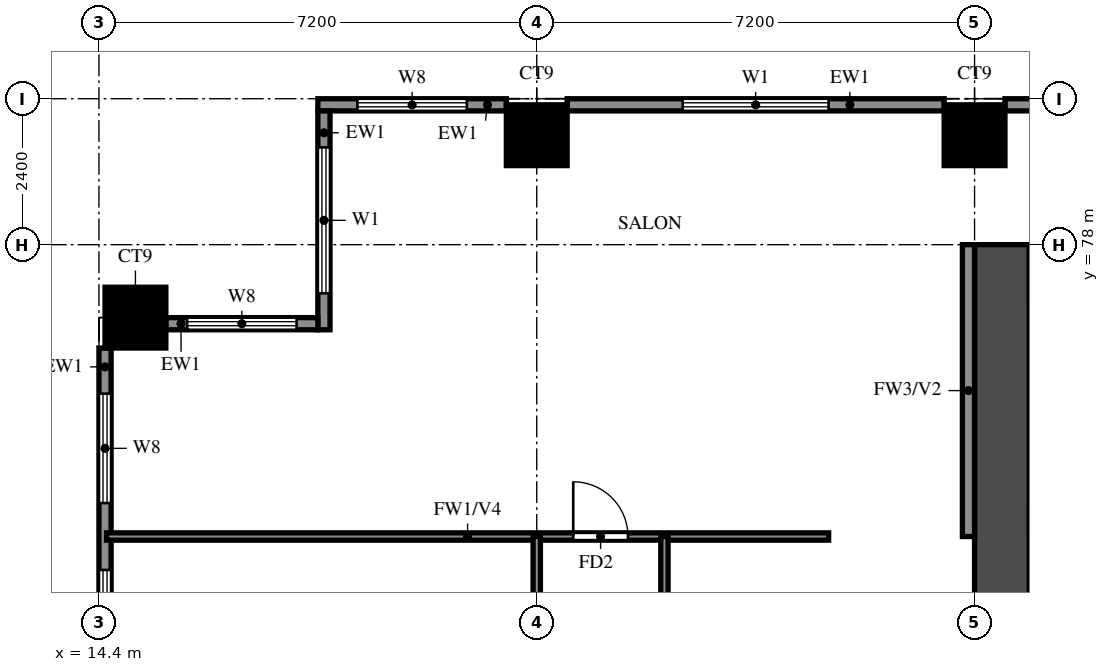
"""IFC4 building model, lengths in metres.
Left out: names, types, materials, properties, quantities, classifications, styles, units other than length and angle.
Written with IfcOpenShell. Run it as: python <this file> out.ifc"""

import sys

from ifc_helpers import new_model, si_unit, direction, frame, frame_2d, origin, origin_2d, place, context, subcontext, project, spatial, rectangle, extrude, source, transform, mapped, element, fill, save


model = new_model("IFC4")
c1 = context("Model", 3, precision=1e-05, world=origin(), true_north=direction((0.0, 1.0)))
c2 = subcontext(c1, "Body", "Model", "MODEL_VIEW")
j1 = project(units=[si_unit("LENGTHUNIT", "METRE"), si_unit("PLANEANGLEUNIT", "RADIAN")], contexts=[c1])
p1 = place(None, origin())
s1 = spatial("IfcSite", under=j1, at=p1, CompositionType="ELEMENT")
p2 = place(p1, origin())
s2 = spatial("IfcBuilding", under=s1, at=p2, CompositionType="ELEMENT")
p3 = place(p2, frame((0.0, 0.0, 69.0)))
s3 = spatial("IfcBuildingStorey", under=s2, at=p3, CompositionType="ELEMENT", Elevation=69.0)
m1 = source(origin(), c2, "Body", "SweptSolid", [
    extrude(rectangle(XDim=1.0, YDim=1.0, at=origin_2d()), origin(), (0.0, 0.0, 1.0), 3.18),
])
for number, where, z_axis, x_axis in (
    (1, (15.0, 76.8, 0.0), (0.0, 0.0, 1.0), (1.0, 0.0, 0.0)),
    (2, (21.6, 79.8, 0.0), (0.0, 0.0, 1.0), (1.0, 0.0, 0.0)),
    (3, (28.8, 79.8, 0.0), (0.0, 0.0, 1.0), (1.0, 0.0, 0.0)),
):
    element("IfcColumn", number, at=place(p3, frame(where, z_axis=z_axis, x_axis=x_axis)), inside=s3, PredefinedType="COLUMN", context=c2, shape_type="MappedRepresentation", body=[
        mapped(m1, transform((0.0, 0.0, 0.0))),
    ])
p4 = place(p3, frame((29.25, 66.0, 0.0), z_axis=(0.0, 0.0, 1.0), x_axis=(0.0, 1.0, 0.0)))
e4 = element("IfcWall", 4, at=p4, inside=s3, PredefinedType="SHEAR", context=c2, shape_type="SweptSolid", body=[
    extrude(rectangle(XDim=12.0, YDim=0.9, at=frame_2d((6.0, 0.0))), origin(), (0.0, 0.0, 1.0), 3.18),
])
p5 = place(p3, frame((29.7, 73.475, 0.0), z_axis=(0.0, 0.0, 1.0), x_axis=(1.0, 0.0, 0.0)))
e5 = element("IfcWall", 5, at=p5, inside=s3, PredefinedType="SHEAR", context=c2, shape_type="SweptSolid", body=[
    extrude(rectangle(XDim=3.175, YDim=0.45, at=frame_2d((1.587, 0.0))), origin(), (0.0, 0.0, 1.0), 3.18),
])
p6 = place(p3, frame((35.5, 80.3, 0.0), z_axis=(0.0, 0.0, 1.0), x_axis=(-1.0, 0.0, 0.0)))
e6 = element("IfcWall", 6, at=p6, inside=s3, PredefinedType="SOLIDWALL", context=c2, shape_type="SweptSolid", body=[
    extrude(rectangle(XDim=6.2, YDim=0.2, at=frame_2d((3.1, 0.0))), origin(), (0.0, 0.0, 1.0), 3.18),
])
p7 = place(p3, frame((28.3, 80.3, 0.0), z_axis=(0.0, 0.0, 1.0), x_axis=(-1.0, 0.0, 0.0)))
e7 = element("IfcWall", 7, at=p7, inside=s3, PredefinedType="SOLIDWALL", context=c2, shape_type="SweptSolid", body=[
    extrude(rectangle(XDim=6.2, YDim=0.2, at=frame_2d((3.1, 0.0))), origin(), (0.0, 0.0, 1.0), 3.18),
])
p8 = place(p7, frame((1.9, 0.0, 0.6)))
e8 = element("IfcOpeningElement", 8, at=p8, cuts=e7, PredefinedType="OPENING", context=c2, shape_type="SweptSolid", body=[
    extrude(rectangle(XDim=2.4, YDim=2.4, at=frame_2d((1.2, 1.2))), frame((0.0, 0.11, 0.0), z_axis=(0.0, -1.0, 0.0), x_axis=(1.0, 0.0, 0.0)), (0.0, 0.0, 1.0), 0.22),
])
p9 = place(p3, frame((21.1, 80.3, 0.0), z_axis=(0.0, 0.0, 1.0), x_axis=(-1.0, 0.0, 0.0)))
e9 = element("IfcWall", 9, at=p9, inside=s3, PredefinedType="SOLIDWALL", context=c2, shape_type="SweptSolid", body=[
    extrude(rectangle(XDim=3.1, YDim=0.2, at=frame_2d((1.55, 0.0))), origin(), (0.0, 0.0, 1.0), 3.18),
])
p10 = place(p9, frame((0.65, 0.0, 0.6)))
e10 = element("IfcOpeningElement", 10, at=p10, cuts=e9, PredefinedType="OPENING", context=c2, shape_type="SweptSolid", body=[
    extrude(rectangle(XDim=1.8, YDim=2.4, at=frame_2d((0.9, 1.2))), frame((0.0, 0.11, 0.0), z_axis=(0.0, -1.0, 0.0), x_axis=(1.0, 0.0, 0.0)), (0.0, 0.0, 1.0), 0.22),
])
p11 = place(p3, frame((18.1, 80.2, 0.0), z_axis=(0.0, 0.0, 1.0), x_axis=(0.0, -1.0, 0.0)))
e11 = element("IfcWall", 11, at=p11, inside=s3, PredefinedType="SOLIDWALL", context=c2, shape_type="SweptSolid", body=[
    extrude(rectangle(XDim=3.6, YDim=0.2, at=frame_2d((1.8, 0.0))), origin(), (0.0, 0.0, 1.0), 3.18),
])
p12 = place(p11, frame((0.6, 0.0, 0.6)))
e12 = element("IfcOpeningElement", 12, at=p12, cuts=e11, PredefinedType="OPENING", context=c2, shape_type="SweptSolid", body=[
    extrude(rectangle(XDim=2.4, YDim=2.4, at=frame_2d((1.2, 1.2))), frame((0.0, 0.11, 0.0), z_axis=(0.0, -1.0, 0.0), x_axis=(1.0, 0.0, 0.0)), (0.0, 0.0, 1.0), 0.22),
])
p13 = place(p3, frame((18.0, 76.7, 0.0), z_axis=(0.0, 0.0, 1.0), x_axis=(-1.0, 0.0, 0.0)))
e13 = element("IfcWall", 13, at=p13, inside=s3, PredefinedType="SOLIDWALL", context=c2, shape_type="SweptSolid", body=[
    extrude(rectangle(XDim=2.5, YDim=0.2, at=frame_2d((1.25, 0.0))), origin(), (0.0, 0.0, 1.0), 3.18),
])
p14 = place(p13, frame((0.35, 0.0, 0.6)))
e14 = element("IfcOpeningElement", 14, at=p14, cuts=e13, PredefinedType="OPENING", context=c2, shape_type="SweptSolid", body=[
    extrude(rectangle(XDim=1.8, YDim=2.4, at=frame_2d((0.9, 1.2))), frame((0.0, 0.11, 0.0), z_axis=(0.0, -1.0, 0.0), x_axis=(1.0, 0.0, 0.0)), (0.0, 0.0, 1.0), 0.22),
])
p15 = place(p3, frame((14.5, 76.3, 0.0), z_axis=(0.0, 0.0, 1.0), x_axis=(0.0, -1.0, 0.0)))
e15 = element("IfcWall", 15, at=p15, inside=s3, PredefinedType="SOLIDWALL", context=c2, shape_type="SweptSolid", body=[
    extrude(rectangle(XDim=6.2, YDim=0.2, at=frame_2d((3.1, 0.0))), origin(), (0.0, 0.0, 1.0), 3.18),
])
p16 = place(p15, frame((3.65, 0.0, 0.6)))
e16 = element("IfcOpeningElement", 16, at=p16, cuts=e15, PredefinedType="OPENING", context=c2, shape_type="SweptSolid", body=[
    extrude(rectangle(XDim=1.8, YDim=2.4, at=frame_2d((0.9, 1.2))), frame((0.0, 0.11, 0.0), z_axis=(0.0, -1.0, 0.0), x_axis=(1.0, 0.0, 0.0)), (0.0, 0.0, 1.0), 0.22),
])
p17 = place(p15, frame((0.75, 0.0, 0.6)))
e17 = element("IfcOpeningElement", 17, at=p17, cuts=e15, PredefinedType="OPENING", context=c2, shape_type="SweptSolid", body=[
    extrude(rectangle(XDim=1.8, YDim=2.4, at=frame_2d((0.9, 1.2))), frame((0.0, 0.11, 0.0), z_axis=(0.0, -1.0, 0.0), x_axis=(1.0, 0.0, 0.0)), (0.0, 0.0, 1.0), 0.22),
])
p18 = place(p3, frame((28.7, 73.2, 0.0), z_axis=(0.0, 0.0, 1.0), x_axis=(0.0, 1.0, 0.0)))
e18 = element("IfcWall", 18, at=p18, inside=s3, PredefinedType="SOLIDWALL", context=c2, shape_type="SweptSolid", body=[
    extrude(rectangle(XDim=4.8, YDim=0.2, at=frame_2d((2.4, 0.0))), origin(), (0.0, 0.0, 1.0), 3.18),
])
p19 = place(p3, frame((14.525, 73.2, 0.0), z_axis=(0.0, 0.0, 1.0), x_axis=(1.0, 0.0, 0.0)))
e19 = element("IfcWall", 19, at=p19, inside=s3, PredefinedType="PARTITIONING", context=c2, shape_type="SweptSolid", body=[
    extrude(rectangle(XDim=11.875, YDim=0.12, at=frame_2d((5.938, 0.0))), origin(), (0.0, 0.0, 1.0), 2.28),
])
p20 = place(p19, frame((7.675, 0.0, 0.0)))
e20 = element("IfcOpeningElement", 20, at=p20, cuts=e19, PredefinedType="OPENING", context=c2, shape_type="SweptSolid", body=[
    extrude(rectangle(XDim=0.9, YDim=2.1, at=frame_2d((0.45, 1.05))), frame((0.0, 0.07, 0.0), z_axis=(0.0, -1.0, 0.0), x_axis=(1.0, 0.0, 0.0)), (0.0, 0.0, 1.0), 0.14),
])
p21 = place(p3, frame((21.6, 33.725, 0.0), z_axis=(0.0, 0.0, 1.0), x_axis=(0.0, 1.0, 0.0)))
e21 = element("IfcWall", 21, at=p21, inside=s3, PredefinedType="PARTITIONING", context=c2, shape_type="SweptSolid", body=[
    extrude(rectangle(XDim=39.475, YDim=0.12, at=frame_2d((19.737, 0.0))), origin(), (0.0, 0.0, 1.0), 3.18),
])
p22 = place(p21, frame((7.775, 0.0, 0.0)))
e22 = element("IfcOpeningElement", 22, at=p22, cuts=e21, PredefinedType="OPENING", context=c2, shape_type="SweptSolid", body=[
    extrude(rectangle(XDim=0.9, YDim=2.1, at=frame_2d((0.45, 1.05))), frame((0.0, 0.07, 0.0), z_axis=(0.0, -1.0, 0.0), x_axis=(1.0, 0.0, 0.0)), (0.0, 0.0, 1.0), 0.14),
])
p23 = place(p21, frame((15.625, 0.0, 0.0)))
e23 = element("IfcOpeningElement", 23, at=p23, cuts=e21, PredefinedType="OPENING", context=c2, shape_type="SweptSolid", body=[
    extrude(rectangle(XDim=0.9, YDim=2.1, at=frame_2d((0.45, 1.05))), frame((0.0, 0.07, 0.0), z_axis=(0.0, -1.0, 0.0), x_axis=(1.0, 0.0, 0.0)), (0.0, 0.0, 1.0), 0.14),
])
p24 = place(p21, frame((19.225, 0.0, 0.0)))
e24 = element("IfcOpeningElement", 24, at=p24, cuts=e21, PredefinedType="OPENING", context=c2, shape_type="SweptSolid", body=[
    extrude(rectangle(XDim=0.9, YDim=2.1, at=frame_2d((0.45, 1.05))), frame((0.0, 0.07, 0.0), z_axis=(0.0, -1.0, 0.0), x_axis=(1.0, 0.0, 0.0)), (0.0, 0.0, 1.0), 0.14),
])
p25 = place(p21, frame((24.325, 0.0, 0.0)))
e25 = element("IfcOpeningElement", 25, at=p25, cuts=e21, PredefinedType="OPENING", context=c2, shape_type="SweptSolid", body=[
    extrude(rectangle(XDim=1.5, YDim=2.1, at=frame_2d((0.75, 1.05))), frame((0.0, 0.07, 0.0), z_axis=(0.0, -1.0, 0.0), x_axis=(1.0, 0.0, 0.0)), (0.0, 0.0, 1.0), 0.14),
])
p26 = place(p21, frame((30.025, 0.0, 0.0)))
e26 = element("IfcOpeningElement", 26, at=p26, cuts=e21, PredefinedType="OPENING", context=c2, shape_type="SweptSolid", body=[
    extrude(rectangle(XDim=0.9, YDim=2.1, at=frame_2d((0.45, 1.05))), frame((0.0, 0.07, 0.0), z_axis=(0.0, -1.0, 0.0), x_axis=(1.0, 0.0, 0.0)), (0.0, 0.0, 1.0), 0.14),
])
p27 = place(p21, frame((33.625, 0.0, 0.0)))
e27 = element("IfcOpeningElement", 27, at=p27, cuts=e21, PredefinedType="OPENING", context=c2, shape_type="SweptSolid", body=[
    extrude(rectangle(XDim=0.9, YDim=2.1, at=frame_2d((0.45, 1.05))), frame((0.0, 0.07, 0.0), z_axis=(0.0, -1.0, 0.0), x_axis=(1.0, 0.0, 0.0)), (0.0, 0.0, 1.0), 0.14),
])
p28 = place(p21, frame((37.225, 0.0, 0.0)))
e28 = element("IfcOpeningElement", 28, at=p28, cuts=e21, PredefinedType="OPENING", context=c2, shape_type="SweptSolid", body=[
    extrude(rectangle(XDim=0.9, YDim=2.1, at=frame_2d((0.45, 1.05))), frame((0.0, 0.07, 0.0), z_axis=(0.0, -1.0, 0.0), x_axis=(1.0, 0.0, 0.0)), (0.0, 0.0, 1.0), 0.14),
])
p29 = place(p3, frame((23.7, 64.8, 0.0), z_axis=(0.0, 0.0, 1.0), x_axis=(0.0, 1.0, 0.0)))
e29 = element("IfcWall", 29, at=p29, inside=s3, PredefinedType="PARTITIONING", context=c2, shape_type="SweptSolid", body=[
    extrude(rectangle(XDim=8.4, YDim=0.12, at=frame_2d((4.2, 0.0))), origin(), (0.0, 0.0, 1.0), 3.18),
])
p30 = place(p29, frame((4.925, 0.0, 0.0)))
e30 = element("IfcOpeningElement", 30, at=p30, cuts=e29, PredefinedType="OPENING", context=c2, shape_type="SweptSolid", body=[
    extrude(rectangle(XDim=0.9, YDim=2.1, at=frame_2d((0.45, 1.05))), frame((0.0, 0.07, 0.0), z_axis=(0.0, -1.0, 0.0), x_axis=(1.0, 0.0, 0.0)), (0.0, 0.0, 1.0), 0.14),
])
p31 = place(p8, origin())
e31 = element("IfcWindow", 31, at=p31, inside=s3, PartitioningType="DOUBLE_PANEL_VERTICAL", PredefinedType="WINDOW", context=c2, shape_type="SweptSolid", body=[
    extrude(rectangle(XDim=2.4, YDim=2.4, at=frame_2d((1.2, 1.2))), frame((0.0, 0.03, 0.0), z_axis=(0.0, -1.0, 0.0), x_axis=(1.0, 0.0, 0.0)), (0.0, 0.0, 1.0), 0.06),
])
fill(e8, e31)
p32 = place(p10, origin())
e32 = element("IfcWindow", 32, at=p32, inside=s3, PartitioningType="DOUBLE_PANEL_VERTICAL", PredefinedType="WINDOW", context=c2, shape_type="SweptSolid", body=[
    extrude(rectangle(XDim=1.8, YDim=2.4, at=frame_2d((0.9, 1.2))), frame((0.0, 0.03, 0.0), z_axis=(0.0, -1.0, 0.0), x_axis=(1.0, 0.0, 0.0)), (0.0, 0.0, 1.0), 0.06),
])
fill(e10, e32)
p33 = place(p12, origin())
e33 = element("IfcWindow", 33, at=p33, inside=s3, PartitioningType="DOUBLE_PANEL_VERTICAL", PredefinedType="WINDOW", context=c2, shape_type="SweptSolid", body=[
    extrude(rectangle(XDim=2.4, YDim=2.4, at=frame_2d((1.2, 1.2))), frame((0.0, 0.03, 0.0), z_axis=(0.0, -1.0, 0.0), x_axis=(1.0, 0.0, 0.0)), (0.0, 0.0, 1.0), 0.06),
])
fill(e12, e33)
p34 = place(p14, origin())
e34 = element("IfcWindow", 34, at=p34, inside=s3, PartitioningType="DOUBLE_PANEL_VERTICAL", PredefinedType="WINDOW", context=c2, shape_type="SweptSolid", body=[
    extrude(rectangle(XDim=1.8, YDim=2.4, at=frame_2d((0.9, 1.2))), frame((0.0, 0.03, 0.0), z_axis=(0.0, -1.0, 0.0), x_axis=(1.0, 0.0, 0.0)), (0.0, 0.0, 1.0), 0.06),
])
fill(e14, e34)
p35 = place(p16, origin())
e35 = element("IfcWindow", 35, at=p35, inside=s3, PartitioningType="DOUBLE_PANEL_VERTICAL", PredefinedType="WINDOW", context=c2, shape_type="SweptSolid", body=[
    extrude(rectangle(XDim=1.8, YDim=2.4, at=frame_2d((0.9, 1.2))), frame((0.0, 0.03, 0.0), z_axis=(0.0, -1.0, 0.0), x_axis=(1.0, 0.0, 0.0)), (0.0, 0.0, 1.0), 0.06),
])
fill(e16, e35)
p36 = place(p17, origin())
e36 = element("IfcWindow", 36, at=p36, inside=s3, PartitioningType="DOUBLE_PANEL_VERTICAL", PredefinedType="WINDOW", context=c2, shape_type="SweptSolid", body=[
    extrude(rectangle(XDim=1.8, YDim=2.4, at=frame_2d((0.9, 1.2))), frame((0.0, 0.03, 0.0), z_axis=(0.0, -1.0, 0.0), x_axis=(1.0, 0.0, 0.0)), (0.0, 0.0, 1.0), 0.06),
])
fill(e17, e36)
p37 = place(p20, origin())
e37 = element("IfcDoor", 37, at=p37, inside=s3, OperationType="SINGLE_SWING_LEFT", PredefinedType="DOOR", context=c2, shape_type="SweptSolid", body=[
    extrude(rectangle(XDim=0.9, YDim=2.1, at=frame_2d((0.45, 1.05))), frame((0.0, 0.025, 0.0), z_axis=(0.0, -1.0, 0.0), x_axis=(1.0, 0.0, 0.0)), (0.0, 0.0, 1.0), 0.05),
])
fill(e20, e37)
save(model, sys.argv[1])
